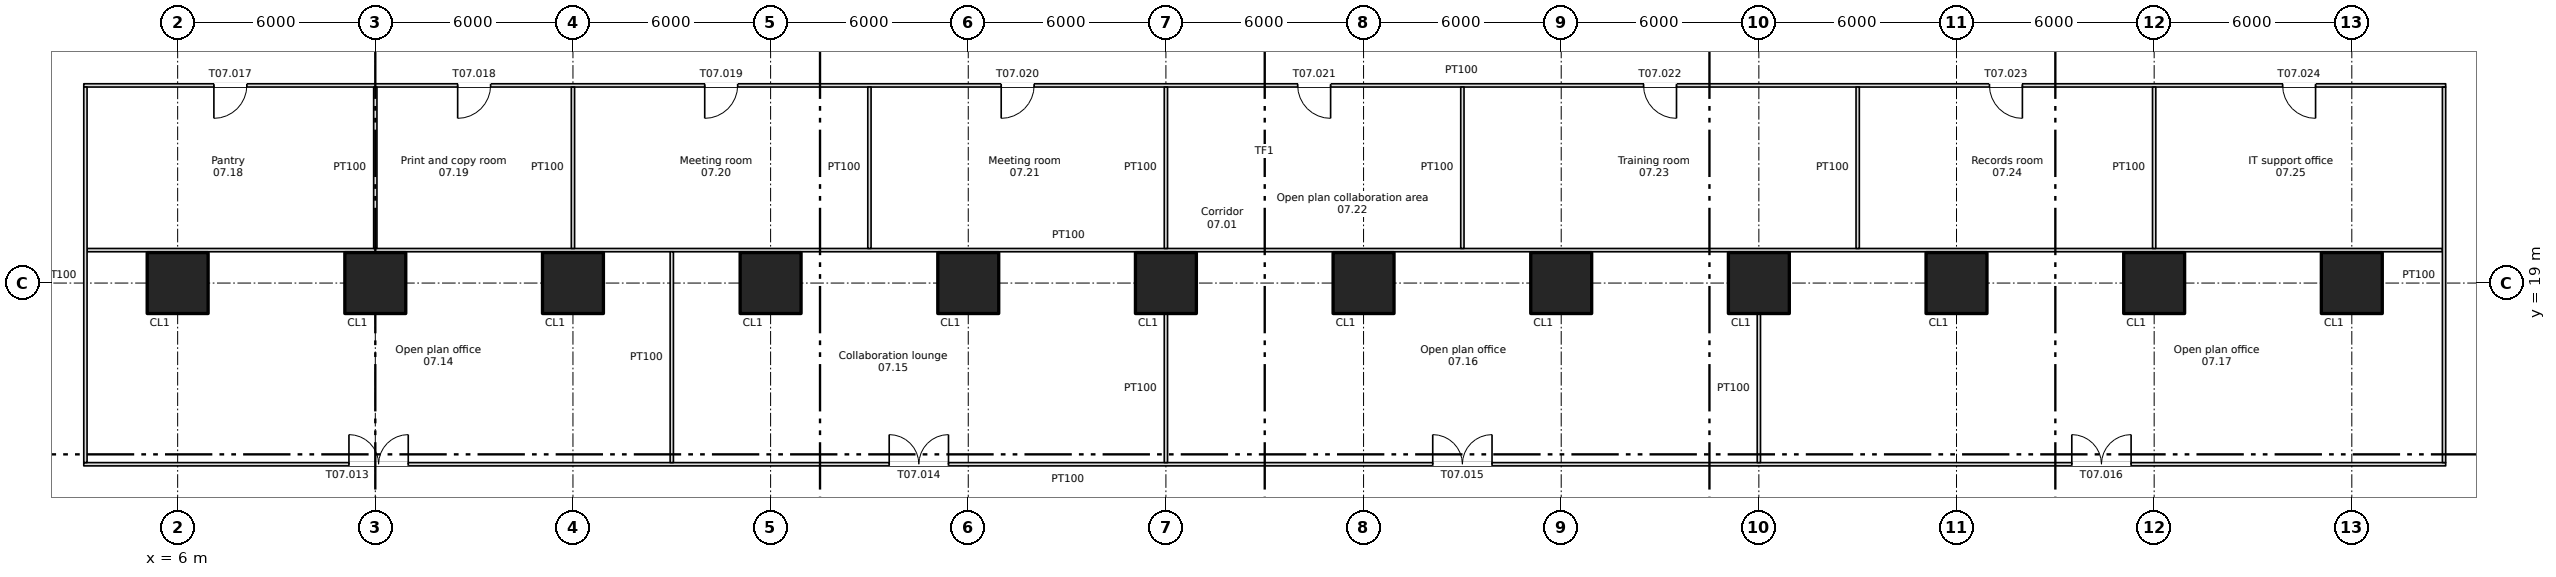
"""IFC4 building model, lengths in metres.
Left out: names, types, materials, properties, quantities, classifications, styles, units other than length and angle.
Written with IfcOpenShell. Run it as: python <this file> out.ifc"""

import sys

from ifc_helpers import new_model, si_unit, direction, frame, frame_2d, origin, origin_2d, place, context, subcontext, project, spatial, rectangle, extrude, element, fill, save


model = new_model("IFC4")
c1 = context("Model", 3, precision=1e-05, world=origin(), true_north=direction((0.0, 1.0)))
c2 = subcontext(c1, "Body", "Model", "MODEL_VIEW")
j1 = project(units=[si_unit("LENGTHUNIT", "METRE"), si_unit("PLANEANGLEUNIT", "RADIAN")], contexts=[c1])
p1 = place(None, origin())
s1 = spatial("IfcSite", under=j1, at=p1, CompositionType="ELEMENT")
p2 = place(p1, origin())
s2 = spatial("IfcBuilding", under=s1, at=p2, CompositionType="ELEMENT")
p3 = place(p2, frame((0.0, 0.0, 22.5)))
s3 = spatial("IfcBuildingStorey", under=s2, at=p3, CompositionType="ELEMENT", Elevation=22.5)
for number, where, z_axis, x_axis in (
    (1, (6.0, 19.0, 0.0), (0.0, 0.0, 1.0), (1.0, 0.0, 0.0)),
    (2, (12.0, 19.0, 0.0), (0.0, 0.0, 1.0), (1.0, 0.0, 0.0)),
    (3, (18.0, 19.0, 0.0), (0.0, 0.0, 1.0), (1.0, 0.0, 0.0)),
    (4, (24.0, 19.0, 0.0), (0.0, 0.0, 1.0), (1.0, 0.0, 0.0)),
    (5, (30.0, 19.0, 0.0), (0.0, 0.0, 1.0), (1.0, 0.0, 0.0)),
    (6, (36.0, 19.0, 0.0), (0.0, 0.0, 1.0), (1.0, 0.0, 0.0)),
    (7, (42.0, 19.0, 0.0), (0.0, 0.0, 1.0), (1.0, 0.0, 0.0)),
    (8, (48.0, 19.0, 0.0), (0.0, 0.0, 1.0), (1.0, 0.0, 0.0)),
    (9, (54.0, 19.0, 0.0), (0.0, 0.0, 1.0), (1.0, 0.0, 0.0)),
    (10, (60.0, 19.0, 0.0), (0.0, 0.0, 1.0), (1.0, 0.0, 0.0)),
    (11, (66.0, 19.0, 0.0), (0.0, 0.0, 1.0), (1.0, 0.0, 0.0)),
    (12, (72.0, 19.0, 0.0), (0.0, 0.0, 1.0), (1.0, 0.0, 0.0)),
):
    element("IfcColumn", number, at=place(p3, frame(where, z_axis=z_axis, x_axis=x_axis)), inside=s3, PredefinedType="COLUMN", context=c2, shape_type="SweptSolid", body=[
        extrude(rectangle(XDim=1.85, YDim=1.85, at=origin_2d()), origin(), (0.0, 0.0, 1.0), 3.35),
    ])
p4 = place(p3, frame((3.15, 13.5, 0.0), z_axis=(0.0, 0.0, 1.0), x_axis=(1.0, 0.0, 0.0)))
e13 = element("IfcWall", 13, at=p4, inside=s3, PredefinedType="PARTITIONING", context=c2, shape_type="SweptSolid", body=[
    extrude(rectangle(XDim=71.7, YDim=0.1, at=frame_2d((35.85, 0.0))), origin(), (0.0, 0.0, 1.0), 3.35),
])
p5 = place(p4, frame((8.05, 0.0, 0.0)))
e14 = element("IfcOpeningElement", 14, at=p5, cuts=e13, PredefinedType="OPENING", context=c2, shape_type="SweptSolid", body=[
    extrude(rectangle(XDim=1.8, YDim=2.1, at=frame_2d((0.9, 1.05))), frame((0.0, 0.06, 0.0), z_axis=(0.0, -1.0, 0.0), x_axis=(1.0, 0.0, 0.0)), (0.0, 0.0, 1.0), 0.12),
])
p6 = place(p4, frame((24.45, 0.0, 0.0)))
e15 = element("IfcOpeningElement", 15, at=p6, cuts=e13, PredefinedType="OPENING", context=c2, shape_type="SweptSolid", body=[
    extrude(rectangle(XDim=1.8, YDim=2.1, at=frame_2d((0.9, 1.05))), frame((0.0, 0.06, 0.0), z_axis=(0.0, -1.0, 0.0), x_axis=(1.0, 0.0, 0.0)), (0.0, 0.0, 1.0), 0.12),
])
p7 = place(p4, frame((40.95, 0.0, 0.0)))
e16 = element("IfcOpeningElement", 16, at=p7, cuts=e13, PredefinedType="OPENING", context=c2, shape_type="SweptSolid", body=[
    extrude(rectangle(XDim=1.8, YDim=2.1, at=frame_2d((0.9, 1.05))), frame((0.0, 0.06, 0.0), z_axis=(0.0, -1.0, 0.0), x_axis=(1.0, 0.0, 0.0)), (0.0, 0.0, 1.0), 0.12),
])
p8 = place(p4, frame((60.35, 0.0, 0.0)))
e17 = element("IfcOpeningElement", 17, at=p8, cuts=e13, PredefinedType="OPENING", context=c2, shape_type="SweptSolid", body=[
    extrude(rectangle(XDim=1.8, YDim=2.1, at=frame_2d((0.9, 1.05))), frame((0.0, 0.06, 0.0), z_axis=(0.0, -1.0, 0.0), x_axis=(1.0, 0.0, 0.0)), (0.0, 0.0, 1.0), 0.12),
])
p9 = place(p3, frame((3.25, 20.0, 0.0), z_axis=(0.0, 0.0, 1.0), x_axis=(1.0, 0.0, 0.0)))
e18 = element("IfcWall", 18, at=p9, inside=s3, PredefinedType="PARTITIONING", context=c2, shape_type="SweptSolid", body=[
    extrude(rectangle(XDim=71.5, YDim=0.1, at=frame_2d((35.75, 0.0))), origin(), (0.0, 0.0, 1.0), 3.35),
])
p10 = place(p3, frame((3.15, 25.0, 0.0), z_axis=(0.0, 0.0, 1.0), x_axis=(1.0, 0.0, 0.0)))
e19 = element("IfcWall", 19, at=p10, inside=s3, PredefinedType="PARTITIONING", context=c2, shape_type="SweptSolid", body=[
    extrude(rectangle(XDim=71.7, YDim=0.1, at=frame_2d((35.85, 0.0))), origin(), (0.0, 0.0, 1.0), 3.35),
])
p11 = place(p10, frame((3.95, 0.0, 0.0)))
e20 = element("IfcOpeningElement", 20, at=p11, cuts=e19, PredefinedType="OPENING", context=c2, shape_type="SweptSolid", body=[
    extrude(rectangle(XDim=1.0, YDim=2.1, at=frame_2d((0.5, 1.05))), frame((0.0, 0.06, 0.0), z_axis=(0.0, -1.0, 0.0), x_axis=(1.0, 0.0, 0.0)), (0.0, 0.0, 1.0), 0.12),
])
p12 = place(p10, frame((11.35, 0.0, 0.0)))
e21 = element("IfcOpeningElement", 21, at=p12, cuts=e19, PredefinedType="OPENING", context=c2, shape_type="SweptSolid", body=[
    extrude(rectangle(XDim=1.0, YDim=2.1, at=frame_2d((0.5, 1.05))), frame((0.0, 0.06, 0.0), z_axis=(0.0, -1.0, 0.0), x_axis=(1.0, 0.0, 0.0)), (0.0, 0.0, 1.0), 0.12),
])
p13 = place(p10, frame((18.85, 0.0, 0.0)))
e22 = element("IfcOpeningElement", 22, at=p13, cuts=e19, PredefinedType="OPENING", context=c2, shape_type="SweptSolid", body=[
    extrude(rectangle(XDim=1.0, YDim=2.1, at=frame_2d((0.5, 1.05))), frame((0.0, 0.06, 0.0), z_axis=(0.0, -1.0, 0.0), x_axis=(1.0, 0.0, 0.0)), (0.0, 0.0, 1.0), 0.12),
])
p14 = place(p10, frame((27.85, 0.0, 0.0)))
e23 = element("IfcOpeningElement", 23, at=p14, cuts=e19, PredefinedType="OPENING", context=c2, shape_type="SweptSolid", body=[
    extrude(rectangle(XDim=1.0, YDim=2.1, at=frame_2d((0.5, 1.05))), frame((0.0, 0.06, 0.0), z_axis=(0.0, -1.0, 0.0), x_axis=(1.0, 0.0, 0.0)), (0.0, 0.0, 1.0), 0.12),
])
p15 = place(p10, frame((36.85, 0.0, 0.0)))
e24 = element("IfcOpeningElement", 24, at=p15, cuts=e19, PredefinedType="OPENING", context=c2, shape_type="SweptSolid", body=[
    extrude(rectangle(XDim=1.0, YDim=2.1, at=frame_2d((0.5, 1.05))), frame((0.0, 0.06, 0.0), z_axis=(0.0, -1.0, 0.0), x_axis=(1.0, 0.0, 0.0)), (0.0, 0.0, 1.0), 0.12),
])
p16 = place(p10, frame((47.35, 0.0, 0.0)))
e25 = element("IfcOpeningElement", 25, at=p16, cuts=e19, PredefinedType="OPENING", context=c2, shape_type="SweptSolid", body=[
    extrude(rectangle(XDim=1.0, YDim=2.1, at=frame_2d((0.5, 1.05))), frame((0.0, 0.06, 0.0), z_axis=(0.0, -1.0, 0.0), x_axis=(1.0, 0.0, 0.0)), (0.0, 0.0, 1.0), 0.12),
])
p17 = place(p10, frame((57.85, 0.0, 0.0)))
e26 = element("IfcOpeningElement", 26, at=p17, cuts=e19, PredefinedType="OPENING", context=c2, shape_type="SweptSolid", body=[
    extrude(rectangle(XDim=1.0, YDim=2.1, at=frame_2d((0.5, 1.05))), frame((0.0, 0.06, 0.0), z_axis=(0.0, -1.0, 0.0), x_axis=(1.0, 0.0, 0.0)), (0.0, 0.0, 1.0), 0.12),
])
p18 = place(p10, frame((66.75, 0.0, 0.0)))
e27 = element("IfcOpeningElement", 27, at=p18, cuts=e19, PredefinedType="OPENING", context=c2, shape_type="SweptSolid", body=[
    extrude(rectangle(XDim=1.0, YDim=2.1, at=frame_2d((0.5, 1.05))), frame((0.0, 0.06, 0.0), z_axis=(0.0, -1.0, 0.0), x_axis=(1.0, 0.0, 0.0)), (0.0, 0.0, 1.0), 0.12),
])
p19 = place(p3, frame((3.2, 13.55, 0.0), z_axis=(0.0, 0.0, 1.0), x_axis=(0.0, 1.0, 0.0)))
e28 = element("IfcWall", 28, at=p19, inside=s3, PredefinedType="PARTITIONING", context=c2, shape_type="SweptSolid", body=[
    extrude(rectangle(XDim=11.4, YDim=0.1, at=frame_2d((5.7, 0.0))), origin(), (0.0, 0.0, 1.0), 3.35),
])
for number, where, z_axis, x_axis in (
    (29, (12.0, 20.05, 0.0), (0.0, 0.0, 1.0), (0.0, 1.0, 0.0)),
    (30, (18.0, 20.05, 0.0), (0.0, 0.0, 1.0), (0.0, 1.0, 0.0)),
):
    element("IfcWall", number, at=place(p3, frame(where, z_axis=z_axis, x_axis=x_axis)), inside=s3, PredefinedType="PARTITIONING", context=c2, shape_type="SweptSolid", body=[
        extrude(rectangle(XDim=4.9, YDim=0.1, at=frame_2d((2.45, 0.0))), origin(), (0.0, 0.0, 1.0), 3.35),
    ])
p20 = place(p3, frame((21.0, 13.55, 0.0), z_axis=(0.0, 0.0, 1.0), x_axis=(0.0, 1.0, 0.0)))
e31 = element("IfcWall", 31, at=p20, inside=s3, PredefinedType="PARTITIONING", context=c2, shape_type="SweptSolid", body=[
    extrude(rectangle(XDim=6.4, YDim=0.1, at=frame_2d((3.2, 0.0))), origin(), (0.0, 0.0, 1.0), 3.35),
])
p21 = place(p3, frame((27.0, 20.05, 0.0), z_axis=(0.0, 0.0, 1.0), x_axis=(0.0, 1.0, 0.0)))
e32 = element("IfcWall", 32, at=p21, inside=s3, PredefinedType="PARTITIONING", context=c2, shape_type="SweptSolid", body=[
    extrude(rectangle(XDim=4.9, YDim=0.1, at=frame_2d((2.45, 0.0))), origin(), (0.0, 0.0, 1.0), 3.35),
])
p22 = place(p3, frame((36.0, 13.55, 0.0), z_axis=(0.0, 0.0, 1.0), x_axis=(0.0, 1.0, 0.0)))
e33 = element("IfcWall", 33, at=p22, inside=s3, PredefinedType="PARTITIONING", context=c2, shape_type="SweptSolid", body=[
    extrude(rectangle(XDim=4.525, YDim=0.1, at=frame_2d((2.262, 0.0))), origin(), (0.0, 0.0, 1.0), 3.35),
])
for number, where, z_axis, x_axis in (
    (34, (36.0, 20.05, 0.0), (0.0, 0.0, 1.0), (0.0, 1.0, 0.0)),
    (35, (45.0, 20.05, 0.0), (0.0, 0.0, 1.0), (0.0, 1.0, 0.0)),
):
    element("IfcWall", number, at=place(p3, frame(where, z_axis=z_axis, x_axis=x_axis)), inside=s3, PredefinedType="PARTITIONING", context=c2, shape_type="SweptSolid", body=[
        extrude(rectangle(XDim=4.9, YDim=0.1, at=frame_2d((2.45, 0.0))), origin(), (0.0, 0.0, 1.0), 3.35),
    ])
p23 = place(p3, frame((54.0, 13.55, 0.0), z_axis=(0.0, 0.0, 1.0), x_axis=(0.0, 1.0, 0.0)))
e36 = element("IfcWall", 36, at=p23, inside=s3, PredefinedType="PARTITIONING", context=c2, shape_type="SweptSolid", body=[
    extrude(rectangle(XDim=4.525, YDim=0.1, at=frame_2d((2.262, 0.0))), origin(), (0.0, 0.0, 1.0), 3.35),
])
for number, where, z_axis, x_axis in (
    (37, (57.0, 20.05, 0.0), (0.0, 0.0, 1.0), (0.0, 1.0, 0.0)),
    (38, (66.0, 20.05, 0.0), (0.0, 0.0, 1.0), (0.0, 1.0, 0.0)),
):
    element("IfcWall", number, at=place(p3, frame(where, z_axis=z_axis, x_axis=x_axis)), inside=s3, PredefinedType="PARTITIONING", context=c2, shape_type="SweptSolid", body=[
        extrude(rectangle(XDim=4.9, YDim=0.1, at=frame_2d((2.45, 0.0))), origin(), (0.0, 0.0, 1.0), 3.35),
    ])
p24 = place(p3, frame((74.8, 13.55, 0.0), z_axis=(0.0, 0.0, 1.0), x_axis=(0.0, 1.0, 0.0)))
e39 = element("IfcWall", 39, at=p24, inside=s3, PredefinedType="PARTITIONING", context=c2, shape_type="SweptSolid", body=[
    extrude(rectangle(XDim=11.4, YDim=0.1, at=frame_2d((5.7, 0.0))), origin(), (0.0, 0.0, 1.0), 3.35),
])
p25 = place(p5, origin())
e40 = element("IfcDoor", 40, at=p25, inside=s3, OperationType="DOUBLE_DOOR_SINGLE_SWING", PredefinedType="DOOR", context=c2, shape_type="SweptSolid", body=[
    extrude(rectangle(XDim=1.8, YDim=2.1, at=frame_2d((0.9, 1.05))), frame((0.0, 0.025, 0.0), z_axis=(0.0, -1.0, 0.0), x_axis=(1.0, 0.0, 0.0)), (0.0, 0.0, 1.0), 0.05),
])
fill(e14, e40)
p26 = place(p6, origin())
e41 = element("IfcDoor", 41, at=p26, inside=s3, OperationType="DOUBLE_DOOR_SINGLE_SWING", PredefinedType="DOOR", context=c2, shape_type="SweptSolid", body=[
    extrude(rectangle(XDim=1.8, YDim=2.1, at=frame_2d((0.9, 1.05))), frame((0.0, 0.025, 0.0), z_axis=(0.0, -1.0, 0.0), x_axis=(1.0, 0.0, 0.0)), (0.0, 0.0, 1.0), 0.05),
])
fill(e15, e41)
p27 = place(p7, origin())
e42 = element("IfcDoor", 42, at=p27, inside=s3, OperationType="DOUBLE_DOOR_SINGLE_SWING", PredefinedType="DOOR", context=c2, shape_type="SweptSolid", body=[
    extrude(rectangle(XDim=1.8, YDim=2.1, at=frame_2d((0.9, 1.05))), frame((0.0, 0.025, 0.0), z_axis=(0.0, -1.0, 0.0), x_axis=(1.0, 0.0, 0.0)), (0.0, 0.0, 1.0), 0.05),
])
fill(e16, e42)
p28 = place(p8, origin())
e43 = element("IfcDoor", 43, at=p28, inside=s3, OperationType="DOUBLE_DOOR_SINGLE_SWING", PredefinedType="DOOR", context=c2, shape_type="SweptSolid", body=[
    extrude(rectangle(XDim=1.8, YDim=2.1, at=frame_2d((0.9, 1.05))), frame((0.0, 0.025, 0.0), z_axis=(0.0, -1.0, 0.0), x_axis=(1.0, 0.0, 0.0)), (0.0, 0.0, 1.0), 0.05),
])
fill(e17, e43)
p29 = place(p11, origin())
e44 = element("IfcDoor", 44, at=p29, inside=s3, OperationType="SINGLE_SWING_LEFT", PredefinedType="DOOR", context=c2, shape_type="SweptSolid", body=[
    extrude(rectangle(XDim=1.0, YDim=2.1, at=frame_2d((0.5, 1.05))), frame((0.0, 0.025, 0.0), z_axis=(0.0, -1.0, 0.0), x_axis=(1.0, 0.0, 0.0)), (0.0, 0.0, 1.0), 0.05),
])
fill(e20, e44)
p30 = place(p12, origin())
e45 = element("IfcDoor", 45, at=p30, inside=s3, OperationType="SINGLE_SWING_LEFT", PredefinedType="DOOR", context=c2, shape_type="SweptSolid", body=[
    extrude(rectangle(XDim=1.0, YDim=2.1, at=frame_2d((0.5, 1.05))), frame((0.0, 0.025, 0.0), z_axis=(0.0, -1.0, 0.0), x_axis=(1.0, 0.0, 0.0)), (0.0, 0.0, 1.0), 0.05),
])
fill(e21, e45)
p31 = place(p13, origin())
e46 = element("IfcDoor", 46, at=p31, inside=s3, OperationType="SINGLE_SWING_LEFT", PredefinedType="DOOR", context=c2, shape_type="SweptSolid", body=[
    extrude(rectangle(XDim=1.0, YDim=2.1, at=frame_2d((0.5, 1.05))), frame((0.0, 0.025, 0.0), z_axis=(0.0, -1.0, 0.0), x_axis=(1.0, 0.0, 0.0)), (0.0, 0.0, 1.0), 0.05),
])
fill(e22, e46)
p32 = place(p14, origin())
e47 = element("IfcDoor", 47, at=p32, inside=s3, OperationType="SINGLE_SWING_LEFT", PredefinedType="DOOR", context=c2, shape_type="SweptSolid", body=[
    extrude(rectangle(XDim=1.0, YDim=2.1, at=frame_2d((0.5, 1.05))), frame((0.0, 0.025, 0.0), z_axis=(0.0, -1.0, 0.0), x_axis=(1.0, 0.0, 0.0)), (0.0, 0.0, 1.0), 0.05),
])
fill(e23, e47)
p33 = place(p15, origin())
e48 = element("IfcDoor", 48, at=p33, inside=s3, OperationType="SINGLE_SWING_RIGHT", PredefinedType="DOOR", context=c2, shape_type="SweptSolid", body=[
    extrude(rectangle(XDim=1.0, YDim=2.1, at=frame_2d((0.5, 1.05))), frame((0.0, 0.025, 0.0), z_axis=(0.0, -1.0, 0.0), x_axis=(1.0, 0.0, 0.0)), (0.0, 0.0, 1.0), 0.05),
])
fill(e24, e48)
p34 = place(p16, origin())
e49 = element("IfcDoor", 49, at=p34, inside=s3, OperationType="SINGLE_SWING_RIGHT", PredefinedType="DOOR", context=c2, shape_type="SweptSolid", body=[
    extrude(rectangle(XDim=1.0, YDim=2.1, at=frame_2d((0.5, 1.05))), frame((0.0, 0.025, 0.0), z_axis=(0.0, -1.0, 0.0), x_axis=(1.0, 0.0, 0.0)), (0.0, 0.0, 1.0), 0.05),
])
fill(e25, e49)
p35 = place(p17, origin())
e50 = element("IfcDoor", 50, at=p35, inside=s3, OperationType="SINGLE_SWING_RIGHT", PredefinedType="DOOR", context=c2, shape_type="SweptSolid", body=[
    extrude(rectangle(XDim=1.0, YDim=2.1, at=frame_2d((0.5, 1.05))), frame((0.0, 0.025, 0.0), z_axis=(0.0, -1.0, 0.0), x_axis=(1.0, 0.0, 0.0)), (0.0, 0.0, 1.0), 0.05),
])
fill(e26, e50)
p36 = place(p18, origin())
e51 = element("IfcDoor", 51, at=p36, inside=s3, OperationType="SINGLE_SWING_RIGHT", PredefinedType="DOOR", context=c2, shape_type="SweptSolid", body=[
    extrude(rectangle(XDim=1.0, YDim=2.1, at=frame_2d((0.5, 1.05))), frame((0.0, 0.025, 0.0), z_axis=(0.0, -1.0, 0.0), x_axis=(1.0, 0.0, 0.0)), (0.0, 0.0, 1.0), 0.05),
])
fill(e27, e51)
save(model, sys.argv[1])
